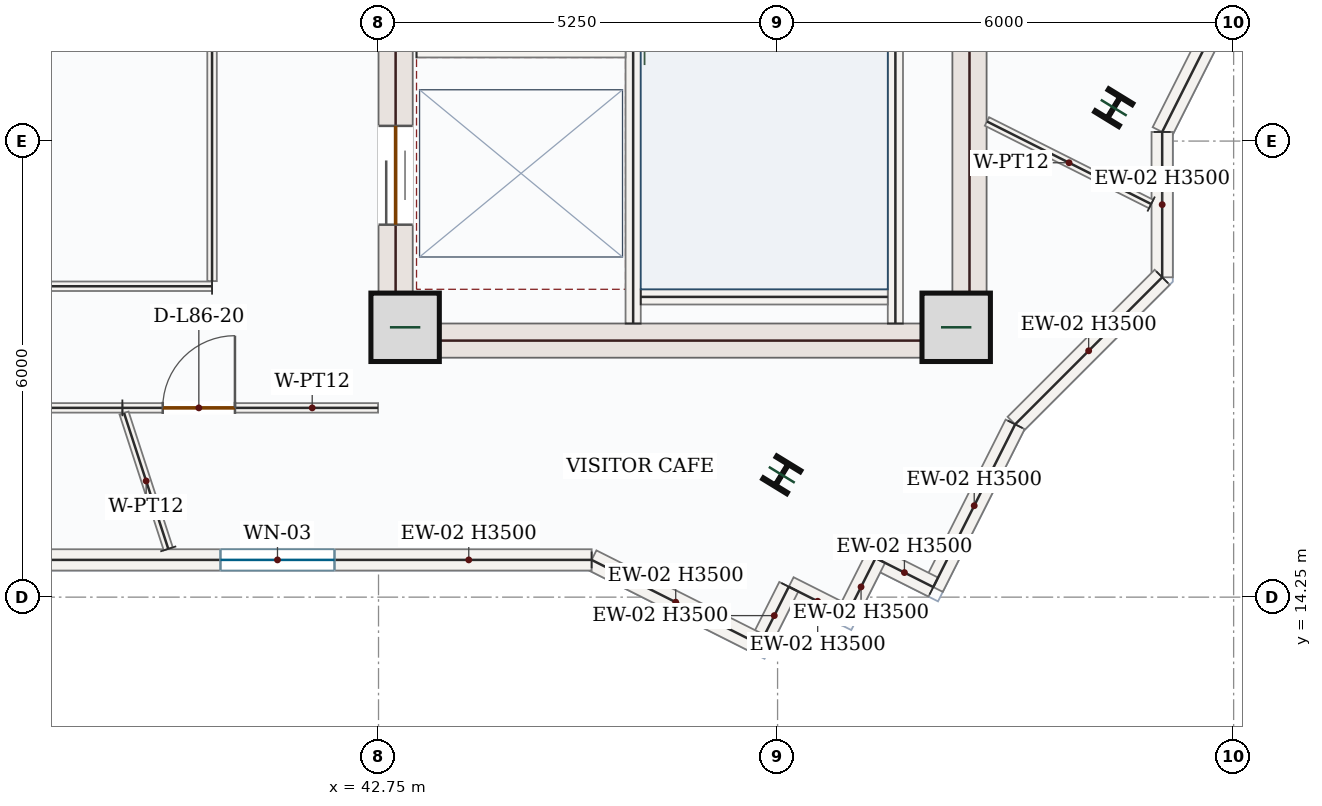
"""IFC4 building model, lengths in metres.
Left out: names, types, materials, properties, quantities, classifications, styles, units other than length and angle.
Written with IfcOpenShell. Run it as: python <this file> out.ifc"""

import sys

from ifc_helpers import new_model, si_unit, direction, frame, frame_2d, origin, origin_2d, place, context, subcontext, project, spatial, rectangle, i_section, extrude, source, transform, mapped, element, fill, save


model = new_model("IFC4")
c1 = context("Model", 3, precision=1e-05, world=origin(), true_north=direction((0.0, 1.0)))
c2 = subcontext(c1, "Body", "Model", "MODEL_VIEW")
j1 = project(units=[si_unit("LENGTHUNIT", "METRE"), si_unit("PLANEANGLEUNIT", "RADIAN")], contexts=[c1])
p1 = place(None, origin())
s1 = spatial("IfcSite", under=j1, at=p1, CompositionType="ELEMENT")
p2 = place(p1, origin())
s2 = spatial("IfcBuilding", under=s1, at=p2, CompositionType="ELEMENT")
p3 = place(p2, frame((0.0, 0.0, 353.55)))
s3 = spatial("IfcBuildingStorey", under=s2, at=p3, CompositionType="ELEMENT", Elevation=353.55)
p4 = place(p3, frame((42.975, 17.4, 0.0), z_axis=(0.0, 0.0, 1.0), x_axis=(0.0, 1.0, 0.0)))
e1 = element("IfcWall", 1, at=p4, inside=s3, PredefinedType="SHEAR", context=c2, shape_type="SweptSolid", body=[
    extrude(rectangle(XDim=8.55, YDim=0.45, at=frame_2d((4.275, 0.0))), origin(), (0.0, 0.0, 1.0), 3.5),
])
p5 = place(p4, frame((6.65, 0.0, 0.0)))
e2 = element("IfcOpeningElement", 2, at=p5, cuts=e1, PredefinedType="OPENING", context=c2, shape_type="SweptSolid", body=[
    extrude(rectangle(XDim=1.1, YDim=2.2, at=frame_2d((0.55, 1.1))), frame((0.0, 0.235, 0.0), z_axis=(0.0, -1.0, 0.0), x_axis=(1.0, 0.0, 0.0)), (0.0, 0.0, 1.0), 0.47),
])
p6 = place(p4, frame((1.75, 0.0, 0.0)))
e3 = element("IfcOpeningElement", 3, at=p6, cuts=e1, PredefinedType="OPENING", context=c2, shape_type="SweptSolid", body=[
    extrude(rectangle(XDim=1.3, YDim=2.2, at=frame_2d((0.65, 1.1))), frame((0.0, 0.235, 0.0), z_axis=(0.0, -1.0, 0.0), x_axis=(1.0, 0.0, 0.0)), (0.0, 0.0, 1.0), 0.47),
])
p7 = place(p4, frame((4.55, 0.0, 0.0)))
e4 = element("IfcOpeningElement", 4, at=p7, cuts=e1, PredefinedType="OPENING", context=c2, shape_type="SweptSolid", body=[
    extrude(rectangle(XDim=0.88, YDim=2.1, at=frame_2d((0.44, 1.05))), frame((0.0, 0.235, 0.0), z_axis=(0.0, -1.0, 0.0), x_axis=(1.0, 0.0, 0.0)), (0.0, 0.0, 1.0), 0.47),
])
m1 = source(origin(), c2, "Body", "SweptSolid", [
    extrude(rectangle(XDim=8.55, YDim=0.45, at=frame_2d((4.275, 0.0))), origin(), (0.0, 0.0, 1.0), 3.5),
])
p8 = place(p3, frame((50.525, 17.4, 0.0), z_axis=(0.0, 0.0, 1.0), x_axis=(0.0, 1.0, 0.0)))
e5 = element("IfcWall", 5, at=p8, inside=s3, PredefinedType="SHEAR", context=c2, shape_type="MappedRepresentation", body=[
    mapped(m1, transform((0.0, 0.0, 0.0), x_axis=(1.0, 0.0, 0.0), y_axis=(0.0, 1.0, 0.0), z_axis=(0.0, 0.0, 1.0), scale=1.0)),
])
m2 = source(origin(), c2, "Body", "SweptSolid", [
    extrude(rectangle(XDim=7.1, YDim=0.45, at=frame_2d((3.55, 0.0))), origin(), (0.0, 0.0, 1.0), 3.5),
])
p9 = place(p3, frame((43.2, 17.625, 0.0), z_axis=(0.0, 0.0, 1.0), x_axis=(1.0, 0.0, 0.0)))
e6 = element("IfcWall", 6, at=p9, inside=s3, PredefinedType="SHEAR", context=c2, shape_type="MappedRepresentation", body=[
    mapped(m2, transform((0.0, 0.0, 0.0), x_axis=(1.0, 0.0, 0.0), y_axis=(0.0, 1.0, 0.0), z_axis=(0.0, 0.0, 1.0), scale=1.0)),
])
m3 = source(origin(), c2, "Body", "SweptSolid", [
    extrude(rectangle(XDim=0.9, YDim=0.9, at=origin_2d()), origin(), (0.0, 0.0, 1.0), 3.75),
])
for number, where, z_axis, x_axis in (
    (7, (43.1, 17.8, 0.0), (0.0, 0.0, 1.0), (1.0, 0.0, 0.0)),
    (8, (50.35, 17.8, 0.0), (0.0, 0.0, 1.0), (1.0, 0.0, 0.0)),
):
    element("IfcColumn", number, at=place(p3, frame(where, z_axis=z_axis, x_axis=x_axis)), inside=s3, PredefinedType="COLUMN", context=c2, shape_type="MappedRepresentation", body=[
        mapped(m3, transform((0.0, 0.0, 0.0), x_axis=(1.0, 0.0, 0.0), y_axis=(0.0, 1.0, 0.0), z_axis=(0.0, 0.0, 1.0), scale=1.0)),
    ])
m4 = source(origin(), c2, "Body", "SweptSolid", [
    extrude(i_section(OverallWidth=0.369, OverallDepth=0.356, WebThickness=0.011, FlangeThickness=0.018, FilletRadius=0.018, at=origin_2d()), origin(), (0.0, 0.0, 1.0), 3.75),
])
for number, where, z_axis, x_axis in (
    (9, (48.055, 15.859, 0.0), (0.0, 0.0, 1.0), (-0.853, 0.522, 0.0)),
    (10, (52.423, 20.689, 0.0), (0.0, 0.0, 1.0), (-0.853, 0.522, 0.0)),
):
    element("IfcColumn", number, at=place(p3, frame(where, z_axis=z_axis, x_axis=x_axis)), inside=s3, PredefinedType="COLUMN", context=c2, shape_type="MappedRepresentation", body=[
        mapped(m4, transform((0.0, 0.0, 0.0), x_axis=(1.0, 0.0, 0.0), y_axis=(0.0, 1.0, 0.0), z_axis=(0.0, 0.0, 1.0), scale=1.0)),
    ])
m5 = source(origin(), c2, "Body", "SweptSolid", [
    extrude(rectangle(XDim=3.218, YDim=0.28, at=frame_2d((1.609, 0.0))), origin(), (0.0, 0.0, 1.0), 3.5),
])
p10 = place(p3, frame((54.506, 23.244, 0.0), z_axis=(0.0, 0.0, 1.0), x_axis=(-0.449336858059, -0.89336240574, 0.0)))
e11 = element("IfcWall", 11, at=p10, inside=s3, PredefinedType="SOLIDWALL", context=c2, shape_type="MappedRepresentation", body=[
    mapped(m5, transform((0.0, 0.0, 0.0), x_axis=(1.0, 0.0, 0.0), y_axis=(0.0, 1.0, 0.0), z_axis=(0.0, 0.0, 1.0), scale=1.0)),
])
m6 = source(origin(), c2, "Body", "SweptSolid", [
    extrude(rectangle(XDim=1.912, YDim=0.28, at=frame_2d((0.956, 0.0))), origin(), (0.0, 0.0, 1.0), 3.5),
])
p11 = place(p3, frame((53.06, 20.37, 0.0), z_axis=(0.0, 0.0, 1.0), x_axis=(0.0, -1.0, 0.0)))
e12 = element("IfcWall", 12, at=p11, inside=s3, PredefinedType="SOLIDWALL", context=c2, shape_type="MappedRepresentation", body=[
    mapped(m6, transform((0.0, 0.0, 0.0), x_axis=(1.0, 0.0, 0.0), y_axis=(0.0, 1.0, 0.0), z_axis=(0.0, 0.0, 1.0), scale=1.0)),
])
m7 = source(origin(), c2, "Body", "SweptSolid", [
    extrude(rectangle(XDim=2.736, YDim=0.28, at=frame_2d((1.368, 0.0))), origin(), (0.0, 0.0, 1.0), 3.5),
])
p12 = place(p3, frame((53.06, 18.458, 0.0), z_axis=(0.0, 0.0, 1.0), x_axis=(-0.707106781187, -0.707106781187, 0.0)))
e13 = element("IfcWall", 13, at=p12, inside=s3, PredefinedType="SOLIDWALL", context=c2, shape_type="MappedRepresentation", body=[
    mapped(m7, transform((0.0, 0.0, 0.0), x_axis=(1.0, 0.0, 0.0), y_axis=(0.0, 1.0, 0.0), z_axis=(0.0, 0.0, 1.0), scale=1.0)),
])
m8 = source(origin(), c2, "Body", "SweptSolid", [
    extrude(rectangle(XDim=2.397, YDim=0.28, at=frame_2d((1.198, 0.0))), origin(), (0.0, 0.0, 1.0), 3.5),
])
p13 = place(p3, frame((51.125, 16.523, 0.0), z_axis=(0.0, 0.0, 1.0), x_axis=(-0.449331154558, -0.893365274422, 0.0)))
e14 = element("IfcWall", 14, at=p13, inside=s3, PredefinedType="SOLIDWALL", context=c2, shape_type="MappedRepresentation", body=[
    mapped(m8, transform((0.0, 0.0, 0.0), x_axis=(1.0, 0.0, 0.0), y_axis=(0.0, 1.0, 0.0), z_axis=(0.0, 0.0, 1.0), scale=1.0)),
])
m9 = source(origin(), c2, "Body", "SweptSolid", [
    extrude(rectangle(XDim=0.85, YDim=0.28, at=frame_2d((0.425, 0.0))), origin(), (0.0, 0.0, 1.0), 3.5),
])
p14 = place(p3, frame((50.049, 14.382, 0.0), z_axis=(0.0, 0.0, 1.0), x_axis=(-0.89339064965, 0.449280699695, 0.0)))
e15 = element("IfcWall", 15, at=p14, inside=s3, PredefinedType="SOLIDWALL", context=c2, shape_type="MappedRepresentation", body=[
    mapped(m9, transform((0.0, 0.0, 0.0), x_axis=(1.0, 0.0, 0.0), y_axis=(0.0, 1.0, 0.0), z_axis=(0.0, 0.0, 1.0), scale=1.0)),
])
m10 = source(origin(), c2, "Body", "SweptSolid", [
    extrude(rectangle(XDim=0.85, YDim=0.28, at=frame_2d((0.425, 0.0))), origin(), (0.0, 0.0, 1.0), 3.5),
])
p15 = place(p3, frame((49.289, 14.764, 0.0), z_axis=(0.0, 0.0, 1.0), x_axis=(-0.449509934066, -0.893275332233, 0.0)))
e16 = element("IfcWall", 16, at=p15, inside=s3, PredefinedType="SOLIDWALL", context=c2, shape_type="MappedRepresentation", body=[
    mapped(m10, transform((0.0, 0.0, 0.0), x_axis=(1.0, 0.0, 0.0), y_axis=(0.0, 1.0, 0.0), z_axis=(0.0, 0.0, 1.0), scale=1.0)),
])
for number, where, z_axis, x_axis in (
    (17, (48.907, 14.005, 0.0), (0.0, 0.0, 1.0), (-0.893, 0.449, 0.0)),
    (18, (48.148, 14.387, 0.0), (0.0, 0.0, 1.0), (-0.449, -0.893, 0.0)),
):
    element("IfcWall", number, at=place(p3, frame(where, z_axis=z_axis, x_axis=x_axis)), inside=s3, PredefinedType="SOLIDWALL", context=c2, shape_type="MappedRepresentation", body=[
        mapped(m9, transform((0.0, 0.0, 0.0), x_axis=(1.0, 0.0, 0.0), y_axis=(0.0, 1.0, 0.0), z_axis=(0.0, 0.0, 1.0), scale=1.0)),
    ])
m11 = source(origin(), c2, "Body", "SweptSolid", [
    extrude(rectangle(XDim=2.476, YDim=0.28, at=frame_2d((1.238, 0.0))), origin(), (0.0, 0.0, 1.0), 3.5),
])
p16 = place(p3, frame((47.766, 13.627, 0.0), z_axis=(0.0, 0.0, 1.0), x_axis=(-0.893399530761, 0.449263039249, 0.0)))
e19 = element("IfcWall", 19, at=p16, inside=s3, PredefinedType="SOLIDWALL", context=c2, shape_type="MappedRepresentation", body=[
    mapped(m11, transform((0.0, 0.0, 0.0), x_axis=(1.0, 0.0, 0.0), y_axis=(0.0, 1.0, 0.0), z_axis=(0.0, 0.0, 1.0), scale=1.0)),
])
p17 = place(p3, frame((45.554, 14.74, 0.0), z_axis=(0.0, 0.0, 1.0), x_axis=(-1.0, 0.0, 0.0)))
e20 = element("IfcWall", 20, at=p17, inside=s3, PredefinedType="SOLIDWALL", context=c2, shape_type="SweptSolid", body=[
    extrude(rectangle(XDim=8.265, YDim=0.28, at=frame_2d((4.132, 0.0))), origin(), (0.0, 0.0, 1.0), 3.5),
])
p18 = place(p17, frame((3.383, 0.0, 0.85)))
e21 = element("IfcOpeningElement", 21, at=p18, cuts=e20, PredefinedType="OPENING", context=c2, shape_type="SweptSolid", body=[
    extrude(rectangle(XDim=1.5, YDim=1.5, at=frame_2d((0.75, 0.75))), frame((0.0, 0.15, 0.0), z_axis=(0.0, -1.0, 0.0), x_axis=(1.0, 0.0, 0.0)), (0.0, 0.0, 1.0), 0.3),
])
m12 = source(origin(), c2, "Body", "SweptSolid", [
    extrude(rectangle(XDim=7.87, YDim=0.2, at=frame_2d((3.935, 0.0))), origin(), (0.0, 0.0, 1.0), 3.5),
])
p19 = place(p3, frame((49.55, 17.85, 0.0), z_axis=(0.0, 0.0, 1.0), x_axis=(0.0, 1.0, 0.0)))
e22 = element("IfcWall", 22, at=p19, inside=s3, PredefinedType="SOLIDWALL", context=c2, shape_type="MappedRepresentation", body=[
    mapped(m12, transform((0.0, 0.0, 0.0), x_axis=(1.0, 0.0, 0.0), y_axis=(0.0, 1.0, 0.0), z_axis=(0.0, 0.0, 1.0), scale=1.0)),
])
p20 = place(p3, frame((46.1, 17.85, 0.0), z_axis=(0.0, 0.0, 1.0), x_axis=(0.0, 1.0, 0.0)))
e23 = element("IfcWall", 23, at=p20, inside=s3, PredefinedType="SOLIDWALL", context=c2, shape_type="SweptSolid", body=[
    extrude(rectangle(XDim=8.0, YDim=0.2, at=frame_2d((4.0, 0.0))), origin(), (0.0, 0.0, 1.0), 3.5),
])
p21 = place(p20, frame((6.3, 0.0, 0.0)))
e24 = element("IfcOpeningElement", 24, at=p21, cuts=e23, PredefinedType="OPENING", context=c2, shape_type="SweptSolid", body=[
    extrude(rectangle(XDim=1.05, YDim=2.15, at=frame_2d((0.525, 1.075))), frame((0.0, 0.11, 0.0), z_axis=(0.0, -1.0, 0.0), x_axis=(1.0, 0.0, 0.0)), (0.0, 0.0, 1.0), 0.22),
])
m13 = source(origin(), c2, "Body", "SweptSolid", [
    extrude(rectangle(XDim=3.25, YDim=0.2, at=frame_2d((1.625, 0.0))), origin(), (0.0, 0.0, 1.0), 3.5),
])
p22 = place(p3, frame((46.2, 18.2, 0.0), z_axis=(0.0, 0.0, 1.0), x_axis=(1.0, 0.0, 0.0)))
e25 = element("IfcWall", 25, at=p22, inside=s3, PredefinedType="SOLIDWALL", context=c2, shape_type="MappedRepresentation", body=[
    mapped(m13, transform((0.0, 0.0, 0.0), x_axis=(1.0, 0.0, 0.0), y_axis=(0.0, 1.0, 0.0), z_axis=(0.0, 0.0, 1.0), scale=1.0)),
])
m14 = source(origin(), c2, "Body", "SweptSolid", [
    extrude(rectangle(XDim=2.75, YDim=0.2, at=frame_2d((1.375, 0.0))), origin(), (0.0, 0.0, 1.0), 3.5),
])
p23 = place(p3, frame((43.25, 21.45, 0.0), z_axis=(0.0, 0.0, 1.0), x_axis=(1.0, 0.0, 0.0)))
e26 = element("IfcWall", 26, at=p23, inside=s3, PredefinedType="SOLIDWALL", context=c2, shape_type="MappedRepresentation", body=[
    mapped(m14, transform((0.0, 0.0, 0.0), x_axis=(1.0, 0.0, 0.0), y_axis=(0.0, 1.0, 0.0), z_axis=(0.0, 0.0, 1.0), scale=1.0)),
])
m15 = source(origin(), c2, "Body", "SweptSolid", [
    extrude(rectangle(XDim=2.418, YDim=0.125, at=frame_2d((1.209, 0.0))), origin(), (0.0, 0.0, 1.0), 3.5),
])
p24 = place(p3, frame((52.915, 19.422, 0.0), z_axis=(0.0, 0.0, 1.0), x_axis=(-0.893374646663, 0.449312520078, 0.0)))
e27 = element("IfcWall", 27, at=p24, inside=s3, PredefinedType="PARTITIONING", context=c2, shape_type="MappedRepresentation", body=[
    mapped(m15, transform((0.0, 0.0, 0.0), x_axis=(1.0, 0.0, 0.0), y_axis=(0.0, 1.0, 0.0), z_axis=(0.0, 0.0, 1.0), scale=1.0)),
])
p25 = place(p3, frame((39.38, 16.74, 0.0), z_axis=(0.0, 0.0, 1.0), x_axis=(1.0, 0.0, 0.0)))
e28 = element("IfcWall", 28, at=p25, inside=s3, PredefinedType="PARTITIONING", context=c2, shape_type="SweptSolid", body=[
    extrude(rectangle(XDim=3.364, YDim=0.125, at=frame_2d((1.682, 0.0))), origin(), (0.0, 0.0, 1.0), 3.5),
])
p26 = place(p25, frame((0.531, 0.0, 0.0)))
e29 = element("IfcOpeningElement", 29, at=p26, cuts=e28, PredefinedType="OPENING", context=c2, shape_type="SweptSolid", body=[
    extrude(rectangle(XDim=0.95, YDim=2.15, at=frame_2d((0.475, 1.075))), frame((0.0, 0.073, 0.0), z_axis=(0.0, -1.0, 0.0), x_axis=(1.0, 0.0, 0.0)), (0.0, 0.0, 1.0), 0.145),
])
m16 = source(origin(), c2, "Body", "SweptSolid", [
    extrude(rectangle(XDim=1.88, YDim=0.125, at=frame_2d((0.94, 0.0))), origin(), (0.0, 0.0, 1.0), 3.5),
])
p27 = place(p3, frame((39.984, 14.885, 0.0), z_axis=(0.0, 0.0, 1.0), x_axis=(-0.309479545997, 0.950906099786, 0.0)))
e30 = element("IfcWall", 30, at=p27, inside=s3, PredefinedType="PARTITIONING", context=c2, shape_type="MappedRepresentation", body=[
    mapped(m16, transform((0.0, 0.0, 0.0), x_axis=(1.0, 0.0, 0.0), y_axis=(0.0, 1.0, 0.0), z_axis=(0.0, 0.0, 1.0), scale=1.0)),
])
m17 = source(origin(), c2, "Body", "SweptSolid", [
    extrude(rectangle(XDim=9.12, YDim=0.125, at=frame_2d((4.56, 0.0))), origin(), (0.0, 0.0, 1.0), 3.5),
])
p28 = place(p3, frame((40.56, 18.34, 0.0), z_axis=(0.0, 0.0, 1.0), x_axis=(-1.0, 0.0, 0.0)))
e31 = element("IfcWall", 31, at=p28, inside=s3, PredefinedType="PARTITIONING", context=c2, shape_type="MappedRepresentation", body=[
    mapped(m17, transform((0.0, 0.0, 0.0), x_axis=(1.0, 0.0, 0.0), y_axis=(0.0, 1.0, 0.0), z_axis=(0.0, 0.0, 1.0), scale=1.0)),
])
m18 = source(origin(), c2, "Body", "SweptSolid", [
    extrude(rectangle(XDim=7.335, YDim=0.125, at=frame_2d((3.667, 0.0))), origin(), (0.0, 0.0, 1.0), 3.5),
])
p29 = place(p3, frame((40.56, 25.742, 0.0), z_axis=(0.0, 0.0, 1.0), x_axis=(0.0, -1.0, 0.0)))
e32 = element("IfcWall", 32, at=p29, inside=s3, PredefinedType="PARTITIONING", context=c2, shape_type="MappedRepresentation", body=[
    mapped(m18, transform((0.0, 0.0, 0.0), x_axis=(1.0, 0.0, 0.0), y_axis=(0.0, 1.0, 0.0), z_axis=(0.0, 0.0, 1.0), scale=1.0)),
])
p30 = place(p3, frame((29.258, 16.74, 0.0), z_axis=(0.0, 0.0, 1.0), x_axis=(0.999999999709, -2.411847e-05, 0.0)))
e33 = element("IfcWall", 33, at=p30, inside=s3, PredefinedType="PARTITIONING", context=c2, shape_type="SweptSolid", body=[
    extrude(rectangle(XDim=10.123, YDim=0.125, at=frame_2d((5.061, 0.0))), origin(), (0.0, 0.0, 1.0), 3.5),
])
p31 = place(p30, frame((5.962, 0.0, 0.0)))
e34 = element("IfcOpeningElement", 34, at=p31, cuts=e33, PredefinedType="OPENING", context=c2, shape_type="SweptSolid", body=[
    extrude(rectangle(XDim=0.95, YDim=2.15, at=frame_2d((0.475, 1.075))), frame((0.0, 0.073, 0.0), z_axis=(0.0, -1.0, 0.0), x_axis=(1.0, 0.0, 0.0)), (0.0, 0.0, 1.0), 0.145),
])
m19 = source(origin(), c2, "Body", "SweptSolid", [
    extrude(rectangle(XDim=1.5, YDim=1.5, at=frame_2d((0.75, 0.75))), frame((0.0, 0.03, 0.0), z_axis=(0.0, -1.0, 0.0), x_axis=(1.0, 0.0, 0.0)), (0.0, 0.0, 1.0), 0.06),
])
p32 = place(p18, origin())
e35 = element("IfcWindow", 35, at=p32, inside=s3, PartitioningType="SINGLE_PANEL", PredefinedType="WINDOW", context=c2, shape_type="MappedRepresentation", body=[
    mapped(m19, transform((0.0, 0.0, 0.0), x_axis=(1.0, 0.0, 0.0), y_axis=(0.0, 1.0, 0.0), z_axis=(0.0, 0.0, 1.0), scale=1.0)),
])
fill(e21, e35)
m20 = source(origin(), c2, "Body", "SweptSolid", [
    extrude(rectangle(XDim=1.3, YDim=2.2, at=frame_2d((0.65, 1.1))), frame((0.0, 0.025, 0.0), z_axis=(0.0, -1.0, 0.0), x_axis=(1.0, 0.0, 0.0)), (0.0, 0.0, 1.0), 0.05),
])
p33 = place(p6, origin())
e36 = element("IfcDoor", 36, at=p33, inside=s3, OperationType="DOUBLE_DOOR_SLIDING", PredefinedType="DOOR", context=c2, shape_type="MappedRepresentation", body=[
    mapped(m20, transform((0.0, 0.0, 0.0), x_axis=(1.0, 0.0, 0.0), y_axis=(0.0, 1.0, 0.0), z_axis=(0.0, 0.0, 1.0), scale=1.0)),
])
fill(e3, e36)
m21 = source(origin(), c2, "Body", "SweptSolid", [
    extrude(rectangle(XDim=0.95, YDim=2.15, at=frame_2d((0.475, 1.075))), frame((0.0, 0.025, 0.0), z_axis=(0.0, -1.0, 0.0), x_axis=(1.0, 0.0, 0.0)), (0.0, 0.0, 1.0), 0.05),
])
p34 = place(p26, origin())
e37 = element("IfcDoor", 37, at=p34, inside=s3, OperationType="SINGLE_SWING_RIGHT", PredefinedType="DOOR", context=c2, shape_type="MappedRepresentation", body=[
    mapped(m21, transform((0.0, 0.0, 0.0), x_axis=(1.0, 0.0, 0.0), y_axis=(0.0, 1.0, 0.0), z_axis=(0.0, 0.0, 1.0), scale=1.0)),
])
fill(e29, e37)
save(model, sys.argv[1])
